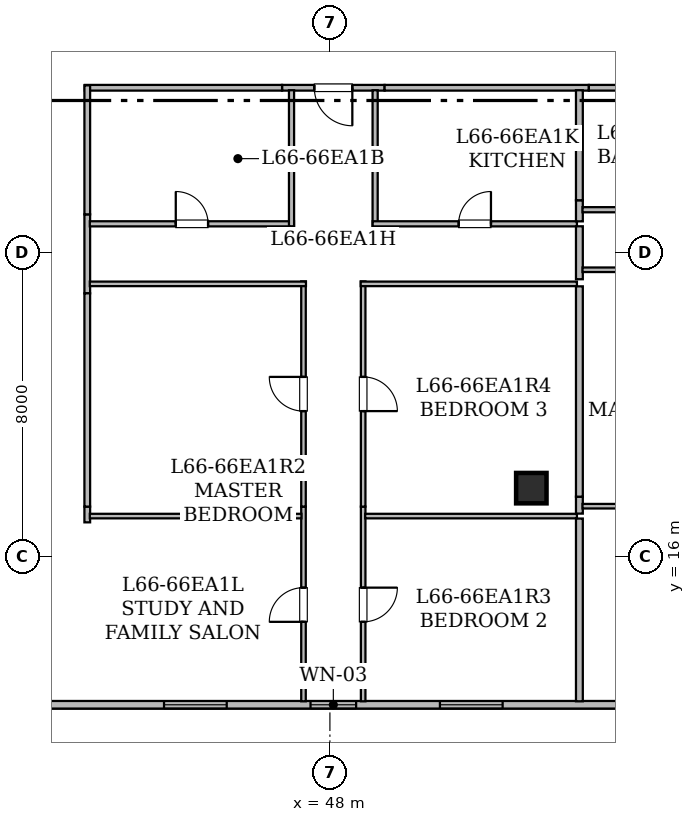
"""IFC4 building model, lengths in metres.
Left out: names, types, materials, properties, quantities, classifications, styles, units other than length and angle.
Written with IfcOpenShell. Run it as: python <this file> out.ifc"""

import sys

from ifc_helpers import new_model, si_unit, direction, frame, frame_2d, origin, origin_2d, place, context, subcontext, project, spatial, rectangle, hollow_rectangle, extrude, element, fill, save


model = new_model("IFC4")
c1 = context("Model", 3, precision=1e-05, world=origin(), true_north=direction((0.0, 1.0)))
c2 = subcontext(c1, "Body", "Model", "MODEL_VIEW")
j1 = project(units=[si_unit("LENGTHUNIT", "METRE"), si_unit("PLANEANGLEUNIT", "RADIAN")], contexts=[c1])
p1 = place(None, origin())
s1 = spatial("IfcSite", under=j1, at=p1, CompositionType="ELEMENT")
p2 = place(p1, origin())
s2 = spatial("IfcBuilding", under=s1, at=p2, CompositionType="ELEMENT")
p3 = place(p2, frame((0.0, 0.0, 257.35)))
s3 = spatial("IfcBuildingStorey", under=s2, at=p3, CompositionType="ELEMENT", Elevation=257.35)
for number, where, z_axis, x_axis in (
    (1, (51.083, 14.5, 0.0), (0.0, 0.0, 1.0), (1.0, 0.0, 0.0)),
    (2, (53.3, 17.8, 0.0), (0.0, 0.0, 1.0), (1.0, 0.0, 0.0)),
):
    element("IfcColumn", number, at=place(p3, frame(where, z_axis=z_axis, x_axis=x_axis)), inside=s3, PredefinedType="COLUMN", context=c2, shape_type="SweptSolid", body=[
        extrude(hollow_rectangle(XDim=0.8, YDim=0.8, WallThickness=0.04, at=origin_2d()), origin(), (0.0, 0.0, 1.0), 3.65),
    ])
p4 = place(p3, frame((65.696, 12.1, 0.0), z_axis=(0.0, 0.0, 1.0), x_axis=(-1.0, 0.0, 0.0)))
e3 = element("IfcWall", 3, at=p4, inside=s3, PredefinedType="STANDARD", context=c2, shape_type="SweptSolid", body=[
    extrude(rectangle(XDim=41.393, YDim=0.2, at=frame_2d((20.697, 0.0))), origin(), (0.0, 0.0, 1.0), 3.43),
])
p5 = place(p4, frame((33.821, 0.0, 0.85)))
e4 = element("IfcOpeningElement", 4, at=p5, cuts=e3, PredefinedType="OPENING", context=c2, shape_type="SweptSolid", body=[
    extrude(rectangle(XDim=1.65, YDim=1.55, at=frame_2d((0.825, 0.775))), frame((0.0, 0.11, 0.0), z_axis=(0.0, -1.0, 0.0), x_axis=(1.0, 0.0, 0.0)), (0.0, 0.0, 1.0), 0.22),
])
p6 = place(p4, frame((39.16, 0.0, 0.85)))
e5 = element("IfcOpeningElement", 5, at=p6, cuts=e3, PredefinedType="OPENING", context=c2, shape_type="SweptSolid", body=[
    extrude(rectangle(XDim=1.65, YDim=1.55, at=frame_2d((0.825, 0.775))), frame((0.0, 0.11, 0.0), z_axis=(0.0, -1.0, 0.0), x_axis=(1.0, 0.0, 0.0)), (0.0, 0.0, 1.0), 0.22),
])
p7 = place(p4, frame((17.006, 0.0, 0.8)))
e6 = element("IfcOpeningElement", 6, at=p7, cuts=e3, PredefinedType="OPENING", context=c2, shape_type="SweptSolid", body=[
    extrude(rectangle(XDim=1.2, YDim=1.5, at=frame_2d((0.6, 0.75))), frame((0.0, 0.11, 0.0), z_axis=(0.0, -1.0, 0.0), x_axis=(1.0, 0.0, 0.0)), (0.0, 0.0, 1.0), 0.22),
])
p8 = place(p4, frame((20.411, 0.0, 0.85)))
e7 = element("IfcOpeningElement", 7, at=p8, cuts=e3, PredefinedType="OPENING", context=c2, shape_type="SweptSolid", body=[
    extrude(rectangle(XDim=1.65, YDim=1.55, at=frame_2d((0.825, 0.775))), frame((0.0, 0.11, 0.0), z_axis=(0.0, -1.0, 0.0), x_axis=(1.0, 0.0, 0.0)), (0.0, 0.0, 1.0), 0.22),
])
p9 = place(p4, frame((13.151, 0.0, 0.85)))
e8 = element("IfcOpeningElement", 8, at=p9, cuts=e3, PredefinedType="OPENING", context=c2, shape_type="SweptSolid", body=[
    extrude(rectangle(XDim=1.65, YDim=1.55, at=frame_2d((0.825, 0.775))), frame((0.0, 0.11, 0.0), z_axis=(0.0, -1.0, 0.0), x_axis=(1.0, 0.0, 0.0)), (0.0, 0.0, 1.0), 0.22),
])
p10 = place(p4, frame((2.936, 0.0, 0.8)))
e9 = element("IfcOpeningElement", 9, at=p10, cuts=e3, PredefinedType="OPENING", context=c2, shape_type="SweptSolid", body=[
    extrude(rectangle(XDim=1.2, YDim=1.5, at=frame_2d((0.6, 0.75))), frame((0.0, 0.11, 0.0), z_axis=(0.0, -1.0, 0.0), x_axis=(1.0, 0.0, 0.0)), (0.0, 0.0, 1.0), 0.22),
])
p11 = place(p4, frame((6.901, 0.0, 0.85)))
e10 = element("IfcOpeningElement", 10, at=p11, cuts=e3, PredefinedType="OPENING", context=c2, shape_type="SweptSolid", body=[
    extrude(rectangle(XDim=1.65, YDim=1.55, at=frame_2d((0.825, 0.775))), frame((0.0, 0.11, 0.0), z_axis=(0.0, -1.0, 0.0), x_axis=(1.0, 0.0, 0.0)), (0.0, 0.0, 1.0), 0.22),
])
p12 = place(p4, frame((0.693, 0.0, 0.85)))
e11 = element("IfcOpeningElement", 11, at=p12, cuts=e3, PredefinedType="OPENING", context=c2, shape_type="SweptSolid", body=[
    extrude(rectangle(XDim=1.65, YDim=1.55, at=frame_2d((0.825, 0.775))), frame((0.0, 0.11, 0.0), z_axis=(0.0, -1.0, 0.0), x_axis=(1.0, 0.0, 0.0)), (0.0, 0.0, 1.0), 0.22),
])
p13 = place(p3, frame((49.439, 28.335, 0.0), z_axis=(0.0, 0.0, 1.0), x_axis=(-1.0, 0.0, 0.0)))
e12 = element("IfcWall", 12, at=p13, inside=s3, PredefinedType="STANDARD", context=c2, shape_type="SweptSolid", body=[
    extrude(rectangle(XDim=2.698, YDim=0.15, at=frame_2d((1.349, 0.0))), origin(), (0.0, 0.0, 1.0), 3.43),
])
p14 = place(p13, frame((0.849, 0.0, 0.0)))
e13 = element("IfcOpeningElement", 13, at=p14, cuts=e12, PredefinedType="OPENING", context=c2, shape_type="SweptSolid", body=[
    extrude(rectangle(XDim=1.0, YDim=2.15, at=frame_2d((0.5, 1.075))), frame((0.0, 0.085, 0.0), z_axis=(0.0, -1.0, 0.0), x_axis=(1.0, 0.0, 0.0)), (0.0, 0.0, 1.0), 0.17),
])
p15 = place(p3, frame((41.615, 25.004, 0.0), z_axis=(0.0, 0.0, 1.0), x_axis=(0.0, -1.0, 0.0)))
e14 = element("IfcWall", 14, at=p15, inside=s3, PredefinedType="STANDARD", context=c2, shape_type="SweptSolid", body=[
    extrude(rectangle(XDim=2.078, YDim=0.15, at=frame_2d((1.039, 0.0))), origin(), (0.0, 0.0, 1.0), 3.43),
])
p16 = place(p3, frame((46.741, 28.335, 0.0), z_axis=(0.0, 0.0, 1.0), x_axis=(-1.0, 0.0, 0.0)))
e15 = element("IfcWall", 15, at=p16, inside=s3, PredefinedType="STANDARD", context=c2, shape_type="SweptSolid", body=[
    extrude(rectangle(XDim=5.191, YDim=0.15, at=frame_2d((2.595, 0.0))), origin(), (0.0, 0.0, 1.0), 3.43),
])
p17 = place(p3, frame((41.615, 28.398, 0.0), z_axis=(0.0, 0.0, 1.0), x_axis=(0.0, -1.0, 0.0)))
e16 = element("IfcWall", 16, at=p17, inside=s3, PredefinedType="STANDARD", context=c2, shape_type="SweptSolid", body=[
    extrude(rectangle(XDim=3.394, YDim=0.15, at=frame_2d((1.697, 0.0))), origin(), (0.0, 0.0, 1.0), 3.43),
])
p18 = place(p3, frame((54.814, 28.335, 0.0), z_axis=(0.0, 0.0, 1.0), x_axis=(-1.0, 0.0, 0.0)))
e17 = element("IfcWall", 17, at=p18, inside=s3, PredefinedType="STANDARD", context=c2, shape_type="SweptSolid", body=[
    extrude(rectangle(XDim=5.375, YDim=0.15, at=frame_2d((2.688, 0.0))), origin(), (0.0, 0.0, 1.0), 2.725),
])
p19 = place(p3, frame((41.615, 17.314, 0.0), z_axis=(0.0, 0.0, 1.0), x_axis=(0.0, -1.0, 0.0)))
e18 = element("IfcWall", 18, at=p19, inside=s3, PredefinedType="STANDARD", context=c2, shape_type="SweptSolid", body=[
    extrude(rectangle(XDim=0.414, YDim=0.15, at=frame_2d((0.207, 0.0))), origin(), (0.0, 0.0, 1.0), 3.43),
])
p20 = place(p3, frame((41.615, 22.926, 0.0), z_axis=(0.0, 0.0, 1.0), x_axis=(0.0, -1.0, 0.0)))
e19 = element("IfcWall", 19, at=p20, inside=s3, PredefinedType="STANDARD", context=c2, shape_type="SweptSolid", body=[
    extrude(rectangle(XDim=5.612, YDim=0.15, at=frame_2d((2.806, 0.0))), origin(), (0.0, 0.0, 1.0), 2.725),
])
p21 = place(p3, frame((59.796, 28.335, 0.0), z_axis=(0.0, 0.0, 1.0), x_axis=(-1.0, 0.0, 0.0)))
e20 = element("IfcWall", 20, at=p21, inside=s3, PredefinedType="STANDARD", context=c2, shape_type="SweptSolid", body=[
    extrude(rectangle(XDim=4.982, YDim=0.15, at=frame_2d((2.491, 0.0))), origin(), (0.0, 0.0, 1.0), 3.43),
])
p22 = place(p3, frame((41.682, 24.755, 0.0), z_axis=(0.0, 0.0, 1.0), x_axis=(1.0, 0.0, 0.0)))
e21 = element("IfcWall", 21, at=p22, inside=s3, PredefinedType="PARTITIONING", context=c2, shape_type="SweptSolid", body=[
    extrude(rectangle(XDim=5.373, YDim=0.135, at=frame_2d((2.687, 0.0))), origin(), (0.0, 0.0, 1.0), 3.43),
])
p23 = place(p22, frame((2.262, 0.0, 0.0)))
e22 = element("IfcOpeningElement", 22, at=p23, cuts=e21, PredefinedType="OPENING", context=c2, shape_type="SweptSolid", body=[
    extrude(rectangle(XDim=0.85, YDim=2.1, at=frame_2d((0.425, 1.05))), frame((0.0, 0.077, 0.0), z_axis=(0.0, -1.0, 0.0), x_axis=(1.0, 0.0, 0.0)), (0.0, 0.0, 1.0), 0.155),
])
for number, where, z_axis, x_axis in (
    (23, (46.99, 24.69, 0.0), (0.0, 0.0, 1.0), (0.0, 1.0, 0.0)),
    (24, (49.19, 28.27, 0.0), (0.0, 0.0, 1.0), (0.0, -1.0, 0.0)),
):
    element("IfcWall", number, at=place(p3, frame(where, z_axis=z_axis, x_axis=x_axis)), inside=s3, PredefinedType="PARTITIONING", context=c2, shape_type="SweptSolid", body=[
        extrude(rectangle(XDim=3.58, YDim=0.135, at=frame_2d((1.79, 0.0))), origin(), (0.0, 0.0, 1.0), 3.43),
    ])
p24 = place(p3, frame((49.125, 24.755, 0.0), z_axis=(0.0, 0.0, 1.0), x_axis=(1.0, 0.0, 0.0)))
e25 = element("IfcWall", 25, at=p24, inside=s3, PredefinedType="PARTITIONING", context=c2, shape_type="SweptSolid", body=[
    extrude(rectangle(XDim=5.375, YDim=0.135, at=frame_2d((2.688, 0.0))), origin(), (0.0, 0.0, 1.0), 2.725),
])
p25 = place(p24, frame((2.263, 0.0, 0.0)))
e26 = element("IfcOpeningElement", 26, at=p25, cuts=e25, PredefinedType="OPENING", context=c2, shape_type="SweptSolid", body=[
    extrude(rectangle(XDim=0.85, YDim=2.1, at=frame_2d((0.425, 1.05))), frame((0.0, 0.077, 0.0), z_axis=(0.0, -1.0, 0.0), x_axis=(1.0, 0.0, 0.0)), (0.0, 0.0, 1.0), 0.155),
])
p26 = place(p3, frame((47.305, 12.192, 0.0), z_axis=(0.0, 0.0, 1.0), x_axis=(0.0, 1.0, 0.0)))
e27 = element("IfcWall", 27, at=p26, inside=s3, PredefinedType="PARTITIONING", context=c2, shape_type="SweptSolid", body=[
    extrude(rectangle(XDim=5.122, YDim=0.12, at=frame_2d((2.561, 0.0))), origin(), (0.0, 0.0, 1.0), 2.725),
])
p27 = place(p26, frame((2.09, 0.0, 0.0)))
e28 = element("IfcOpeningElement", 28, at=p27, cuts=e27, PredefinedType="OPENING", context=c2, shape_type="SweptSolid", body=[
    extrude(rectangle(XDim=0.9, YDim=2.1, at=frame_2d((0.45, 1.05))), frame((0.0, 0.07, 0.0), z_axis=(0.0, -1.0, 0.0), x_axis=(1.0, 0.0, 0.0)), (0.0, 0.0, 1.0), 0.14),
])
p28 = place(p3, frame((47.305, 17.314, 0.0), z_axis=(0.0, 0.0, 1.0), x_axis=(0.0, 1.0, 0.0)))
e29 = element("IfcWall", 29, at=p28, inside=s3, PredefinedType="PARTITIONING", context=c2, shape_type="SweptSolid", body=[
    extrude(rectangle(XDim=5.926, YDim=0.12, at=frame_2d((2.963, 0.0))), origin(), (0.0, 0.0, 1.0), 2.725),
])
p29 = place(p28, frame((2.513, 0.0, 0.0)))
e30 = element("IfcOpeningElement", 30, at=p29, cuts=e29, PredefinedType="OPENING", context=c2, shape_type="SweptSolid", body=[
    extrude(rectangle(XDim=0.9, YDim=2.1, at=frame_2d((0.45, 1.05))), frame((0.0, 0.07, 0.0), z_axis=(0.0, -1.0, 0.0), x_axis=(1.0, 0.0, 0.0)), (0.0, 0.0, 1.0), 0.14),
])
p30 = place(p3, frame((47.37, 23.175, 0.0), z_axis=(0.0, 0.0, 1.0), x_axis=(-1.0, 0.0, 0.0)))
e31 = element("IfcWall", 31, at=p30, inside=s3, PredefinedType="PARTITIONING", context=c2, shape_type="SweptSolid", body=[
    extrude(rectangle(XDim=5.688, YDim=0.12, at=frame_2d((2.844, 0.0))), origin(), (0.0, 0.0, 1.0), 3.43),
])
p31 = place(p3, frame((48.875, 17.314, 0.0), z_axis=(0.0, 0.0, 1.0), x_axis=(0.0, -1.0, 0.0)))
e32 = element("IfcWall", 32, at=p31, inside=s3, PredefinedType="PARTITIONING", context=c2, shape_type="SweptSolid", body=[
    extrude(rectangle(XDim=5.122, YDim=0.12, at=frame_2d((2.561, 0.0))), origin(), (0.0, 0.0, 1.0), 2.725),
])
p32 = place(p31, frame((2.132, 0.0, 0.0)))
e33 = element("IfcOpeningElement", 33, at=p32, cuts=e32, PredefinedType="OPENING", context=c2, shape_type="SweptSolid", body=[
    extrude(rectangle(XDim=0.9, YDim=2.1, at=frame_2d((0.45, 1.05))), frame((0.0, 0.07, 0.0), z_axis=(0.0, -1.0, 0.0), x_axis=(1.0, 0.0, 0.0)), (0.0, 0.0, 1.0), 0.14),
])
p33 = place(p3, frame((48.875, 23.24, 0.0), z_axis=(0.0, 0.0, 1.0), x_axis=(0.0, -1.0, 0.0)))
e34 = element("IfcWall", 34, at=p33, inside=s3, PredefinedType="PARTITIONING", context=c2, shape_type="SweptSolid", body=[
    extrude(rectangle(XDim=5.926, YDim=0.12, at=frame_2d((2.963, 0.0))), origin(), (0.0, 0.0, 1.0), 2.725),
])
p34 = place(p33, frame((2.513, 0.0, 0.0)))
e35 = element("IfcOpeningElement", 35, at=p34, cuts=e34, PredefinedType="OPENING", context=c2, shape_type="SweptSolid", body=[
    extrude(rectangle(XDim=0.9, YDim=2.1, at=frame_2d((0.45, 1.05))), frame((0.0, 0.07, 0.0), z_axis=(0.0, -1.0, 0.0), x_axis=(1.0, 0.0, 0.0)), (0.0, 0.0, 1.0), 0.14),
])
p35 = place(p3, frame((54.5, 23.175, 0.0), z_axis=(0.0, 0.0, 1.0), x_axis=(-1.0, 0.0, 0.0)))
e36 = element("IfcWall", 36, at=p35, inside=s3, PredefinedType="PARTITIONING", context=c2, shape_type="SweptSolid", body=[
    extrude(rectangle(XDim=5.69, YDim=0.12, at=frame_2d((2.845, 0.0))), origin(), (0.0, 0.0, 1.0), 2.725),
])
p36 = place(p3, frame((54.565, 24.69, 0.0), z_axis=(0.0, 0.0, 1.0), x_axis=(0.0, -1.0, 0.0)))
e37 = element("IfcWall", 37, at=p36, inside=s3, PredefinedType="STANDARD", context=c2, shape_type="SweptSolid", body=[
    extrude(rectangle(XDim=1.393, YDim=0.18, at=frame_2d((0.696, 0.0))), origin(), (0.0, 0.0, 1.0), 2.687),
])
p37 = place(p3, frame((54.565, 25.375, 0.0), z_axis=(0.0, 0.0, 1.0), x_axis=(0.0, -1.0, 0.0)))
e38 = element("IfcWall", 38, at=p37, inside=s3, PredefinedType="STANDARD", context=c2, shape_type="SweptSolid", body=[
    extrude(rectangle(XDim=0.555, YDim=0.18, at=frame_2d((0.277, 0.0))), origin(), (0.0, 0.0, 1.0), 3.43),
])
p38 = place(p3, frame((54.565, 28.27, 0.0), z_axis=(0.0, 0.0, 1.0), x_axis=(0.0, -1.0, 0.0)))
e39 = element("IfcWall", 39, at=p38, inside=s3, PredefinedType="STANDARD", context=c2, shape_type="SweptSolid", body=[
    extrude(rectangle(XDim=2.895, YDim=0.18, at=frame_2d((1.448, 0.0))), origin(), (0.0, 0.0, 1.0), 3.43),
])
p39 = place(p3, frame((41.682, 17.065, 0.0), z_axis=(0.0, 0.0, 1.0), x_axis=(1.0, 0.0, 0.0)))
e40 = element("IfcWall", 40, at=p39, inside=s3, PredefinedType="PARTITIONING", context=c2, shape_type="SweptSolid", body=[
    extrude(rectangle(XDim=5.569, YDim=0.12, at=frame_2d((2.785, 0.0))), origin(), (0.0, 0.0, 1.0), 2.725),
])
p40 = place(p3, frame((48.929, 17.065, 0.0), z_axis=(0.0, 0.0, 1.0), x_axis=(1.0, 0.0, 0.0)))
e41 = element("IfcWall", 41, at=p40, inside=s3, PredefinedType="PARTITIONING", context=c2, shape_type="SweptSolid", body=[
    extrude(rectangle(XDim=5.571, YDim=0.12, at=frame_2d((2.786, 0.0))), origin(), (0.0, 0.0, 1.0), 2.725),
])
p41 = place(p3, frame((54.565, 17.0, 0.0), z_axis=(0.0, 0.0, 1.0), x_axis=(0.0, -1.0, 0.0)))
e42 = element("IfcWall", 42, at=p41, inside=s3, PredefinedType="STANDARD", context=c2, shape_type="SweptSolid", body=[
    extrude(rectangle(XDim=4.808, YDim=0.18, at=frame_2d((2.404, 0.0))), origin(), (0.0, 0.0, 1.0), 2.887),
])
p42 = place(p3, frame((54.565, 17.575, 0.0), z_axis=(0.0, 0.0, 1.0), x_axis=(0.0, -1.0, 0.0)))
e43 = element("IfcWall", 43, at=p42, inside=s3, PredefinedType="STANDARD", context=c2, shape_type="SweptSolid", body=[
    extrude(rectangle(XDim=0.445, YDim=0.18, at=frame_2d((0.223, 0.0))), origin(), (0.0, 0.0, 1.0), 2.725),
])
p43 = place(p3, frame((54.565, 23.11, 0.0), z_axis=(0.0, 0.0, 1.0), x_axis=(0.0, -1.0, 0.0)))
e44 = element("IfcWall", 44, at=p43, inside=s3, PredefinedType="STANDARD", context=c2, shape_type="SweptSolid", body=[
    extrude(rectangle(XDim=5.535, YDim=0.18, at=frame_2d((2.768, 0.0))), origin(), (0.0, 0.0, 1.0), 2.687),
])
p44 = place(p3, frame((54.647, 25.126, 0.0), z_axis=(0.0, 0.0, 1.0), x_axis=(1.0, 0.0, 0.0)))
e45 = element("IfcWall", 45, at=p44, inside=s3, PredefinedType="PARTITIONING", context=c2, shape_type="SweptSolid", body=[
    extrude(rectangle(XDim=5.464, YDim=0.135, at=frame_2d((2.732, 0.0))), origin(), (0.0, 0.0, 1.0), 3.43),
])
p45 = place(p44, frame((2.307, 0.0, 0.0)))
e46 = element("IfcOpeningElement", 46, at=p45, cuts=e45, PredefinedType="OPENING", context=c2, shape_type="SweptSolid", body=[
    extrude(rectangle(XDim=0.85, YDim=2.1, at=frame_2d((0.425, 1.05))), frame((0.0, 0.077, 0.0), z_axis=(0.0, -1.0, 0.0), x_axis=(1.0, 0.0, 0.0)), (0.0, 0.0, 1.0), 0.155),
])
p46 = place(p3, frame((61.44, 23.546, 0.0), z_axis=(0.0, 0.0, 1.0), x_axis=(-1.0, 0.0, 0.0)))
e47 = element("IfcWall", 47, at=p46, inside=s3, PredefinedType="PARTITIONING", context=c2, shape_type="SweptSolid", body=[
    extrude(rectangle(XDim=6.793, YDim=0.12, at=frame_2d((3.396, 0.0))), origin(), (0.0, 0.0, 1.0), 2.687),
])
p47 = place(p46, frame((2.946, 0.0, 0.0)))
e48 = element("IfcOpeningElement", 48, at=p47, cuts=e47, PredefinedType="OPENING", context=c2, shape_type="SweptSolid", body=[
    extrude(rectangle(XDim=0.9, YDim=2.1, at=frame_2d((0.45, 1.05))), frame((0.0, 0.07, 0.0), z_axis=(0.0, -1.0, 0.0), x_axis=(1.0, 0.0, 0.0)), (0.0, 0.0, 1.0), 0.14),
])
p48 = place(p3, frame((54.647, 17.325, 0.0), z_axis=(0.0, 0.0, 1.0), x_axis=(1.0, 0.0, 0.0)))
e49 = element("IfcWall", 49, at=p48, inside=s3, PredefinedType="PARTITIONING", context=c2, shape_type="SweptSolid", body=[
    extrude(rectangle(XDim=6.674, YDim=0.12, at=frame_2d((3.337, 0.0))), origin(), (0.0, 0.0, 1.0), 2.725),
])
p49 = place(p7, origin())
e50 = element("IfcWindow", 50, at=p49, inside=s3, PartitioningType="SINGLE_PANEL", PredefinedType="WINDOW", context=c2, shape_type="SweptSolid", body=[
    extrude(rectangle(XDim=1.2, YDim=1.5, at=frame_2d((0.6, 0.75))), frame((0.0, 0.03, 0.0), z_axis=(0.0, -1.0, 0.0), x_axis=(1.0, 0.0, 0.0)), (0.0, 0.0, 1.0), 0.06),
])
fill(e6, e50)
p50 = place(p8, origin())
e51 = element("IfcWindow", 51, at=p50, inside=s3, PartitioningType="SINGLE_PANEL", PredefinedType="WINDOW", context=c2, shape_type="SweptSolid", body=[
    extrude(rectangle(XDim=1.65, YDim=1.55, at=frame_2d((0.825, 0.775))), frame((0.0, 0.03, 0.0), z_axis=(0.0, -1.0, 0.0), x_axis=(1.0, 0.0, 0.0)), (0.0, 0.0, 1.0), 0.06),
])
fill(e7, e51)
p51 = place(p9, origin())
e52 = element("IfcWindow", 52, at=p51, inside=s3, PartitioningType="SINGLE_PANEL", PredefinedType="WINDOW", context=c2, shape_type="SweptSolid", body=[
    extrude(rectangle(XDim=1.65, YDim=1.55, at=frame_2d((0.825, 0.775))), frame((0.0, 0.03, 0.0), z_axis=(0.0, -1.0, 0.0), x_axis=(1.0, 0.0, 0.0)), (0.0, 0.0, 1.0), 0.06),
])
fill(e8, e52)
p52 = place(p14, origin())
e53 = element("IfcDoor", 53, at=p52, inside=s3, OperationType="SINGLE_SWING_LEFT", PredefinedType="DOOR", context=c2, shape_type="SweptSolid", body=[
    extrude(rectangle(XDim=1.0, YDim=2.15, at=frame_2d((0.5, 1.075))), frame((0.0, 0.025, 0.0), z_axis=(0.0, -1.0, 0.0), x_axis=(1.0, 0.0, 0.0)), (0.0, 0.0, 1.0), 0.05),
])
fill(e13, e53)
p53 = place(p23, origin())
e54 = element("IfcDoor", 54, at=p53, inside=s3, OperationType="SINGLE_SWING_LEFT", PredefinedType="DOOR", context=c2, shape_type="SweptSolid", body=[
    extrude(rectangle(XDim=0.85, YDim=2.1, at=frame_2d((0.425, 1.05))), frame((0.0, 0.025, 0.0), z_axis=(0.0, -1.0, 0.0), x_axis=(1.0, 0.0, 0.0)), (0.0, 0.0, 1.0), 0.05),
])
fill(e22, e54)
p54 = place(p25, origin())
e55 = element("IfcDoor", 55, at=p54, inside=s3, OperationType="SINGLE_SWING_RIGHT", PredefinedType="DOOR", context=c2, shape_type="SweptSolid", body=[
    extrude(rectangle(XDim=0.85, YDim=2.1, at=frame_2d((0.425, 1.05))), frame((0.0, 0.025, 0.0), z_axis=(0.0, -1.0, 0.0), x_axis=(1.0, 0.0, 0.0)), (0.0, 0.0, 1.0), 0.05),
])
fill(e26, e55)
p55 = place(p27, origin())
e56 = element("IfcDoor", 56, at=p55, inside=s3, OperationType="SINGLE_SWING_LEFT", PredefinedType="DOOR", context=c2, shape_type="SweptSolid", body=[
    extrude(rectangle(XDim=0.9, YDim=2.1, at=frame_2d((0.45, 1.05))), frame((0.0, 0.025, 0.0), z_axis=(0.0, -1.0, 0.0), x_axis=(1.0, 0.0, 0.0)), (0.0, 0.0, 1.0), 0.05),
])
fill(e28, e56)
p56 = place(p29, origin())
e57 = element("IfcDoor", 57, at=p56, inside=s3, OperationType="SINGLE_SWING_RIGHT", PredefinedType="DOOR", context=c2, shape_type="SweptSolid", body=[
    extrude(rectangle(XDim=0.9, YDim=2.1, at=frame_2d((0.45, 1.05))), frame((0.0, 0.025, 0.0), z_axis=(0.0, -1.0, 0.0), x_axis=(1.0, 0.0, 0.0)), (0.0, 0.0, 1.0), 0.05),
])
fill(e30, e57)
p57 = place(p32, origin())
e58 = element("IfcDoor", 58, at=p57, inside=s3, OperationType="SINGLE_SWING_LEFT", PredefinedType="DOOR", context=c2, shape_type="SweptSolid", body=[
    extrude(rectangle(XDim=0.9, YDim=2.1, at=frame_2d((0.45, 1.05))), frame((0.0, 0.025, 0.0), z_axis=(0.0, -1.0, 0.0), x_axis=(1.0, 0.0, 0.0)), (0.0, 0.0, 1.0), 0.05),
])
fill(e33, e58)
p58 = place(p34, origin())
e59 = element("IfcDoor", 59, at=p58, inside=s3, OperationType="SINGLE_SWING_RIGHT", PredefinedType="DOOR", context=c2, shape_type="SweptSolid", body=[
    extrude(rectangle(XDim=0.9, YDim=2.1, at=frame_2d((0.45, 1.05))), frame((0.0, 0.025, 0.0), z_axis=(0.0, -1.0, 0.0), x_axis=(1.0, 0.0, 0.0)), (0.0, 0.0, 1.0), 0.05),
])
fill(e35, e59)
save(model, sys.argv[1])
